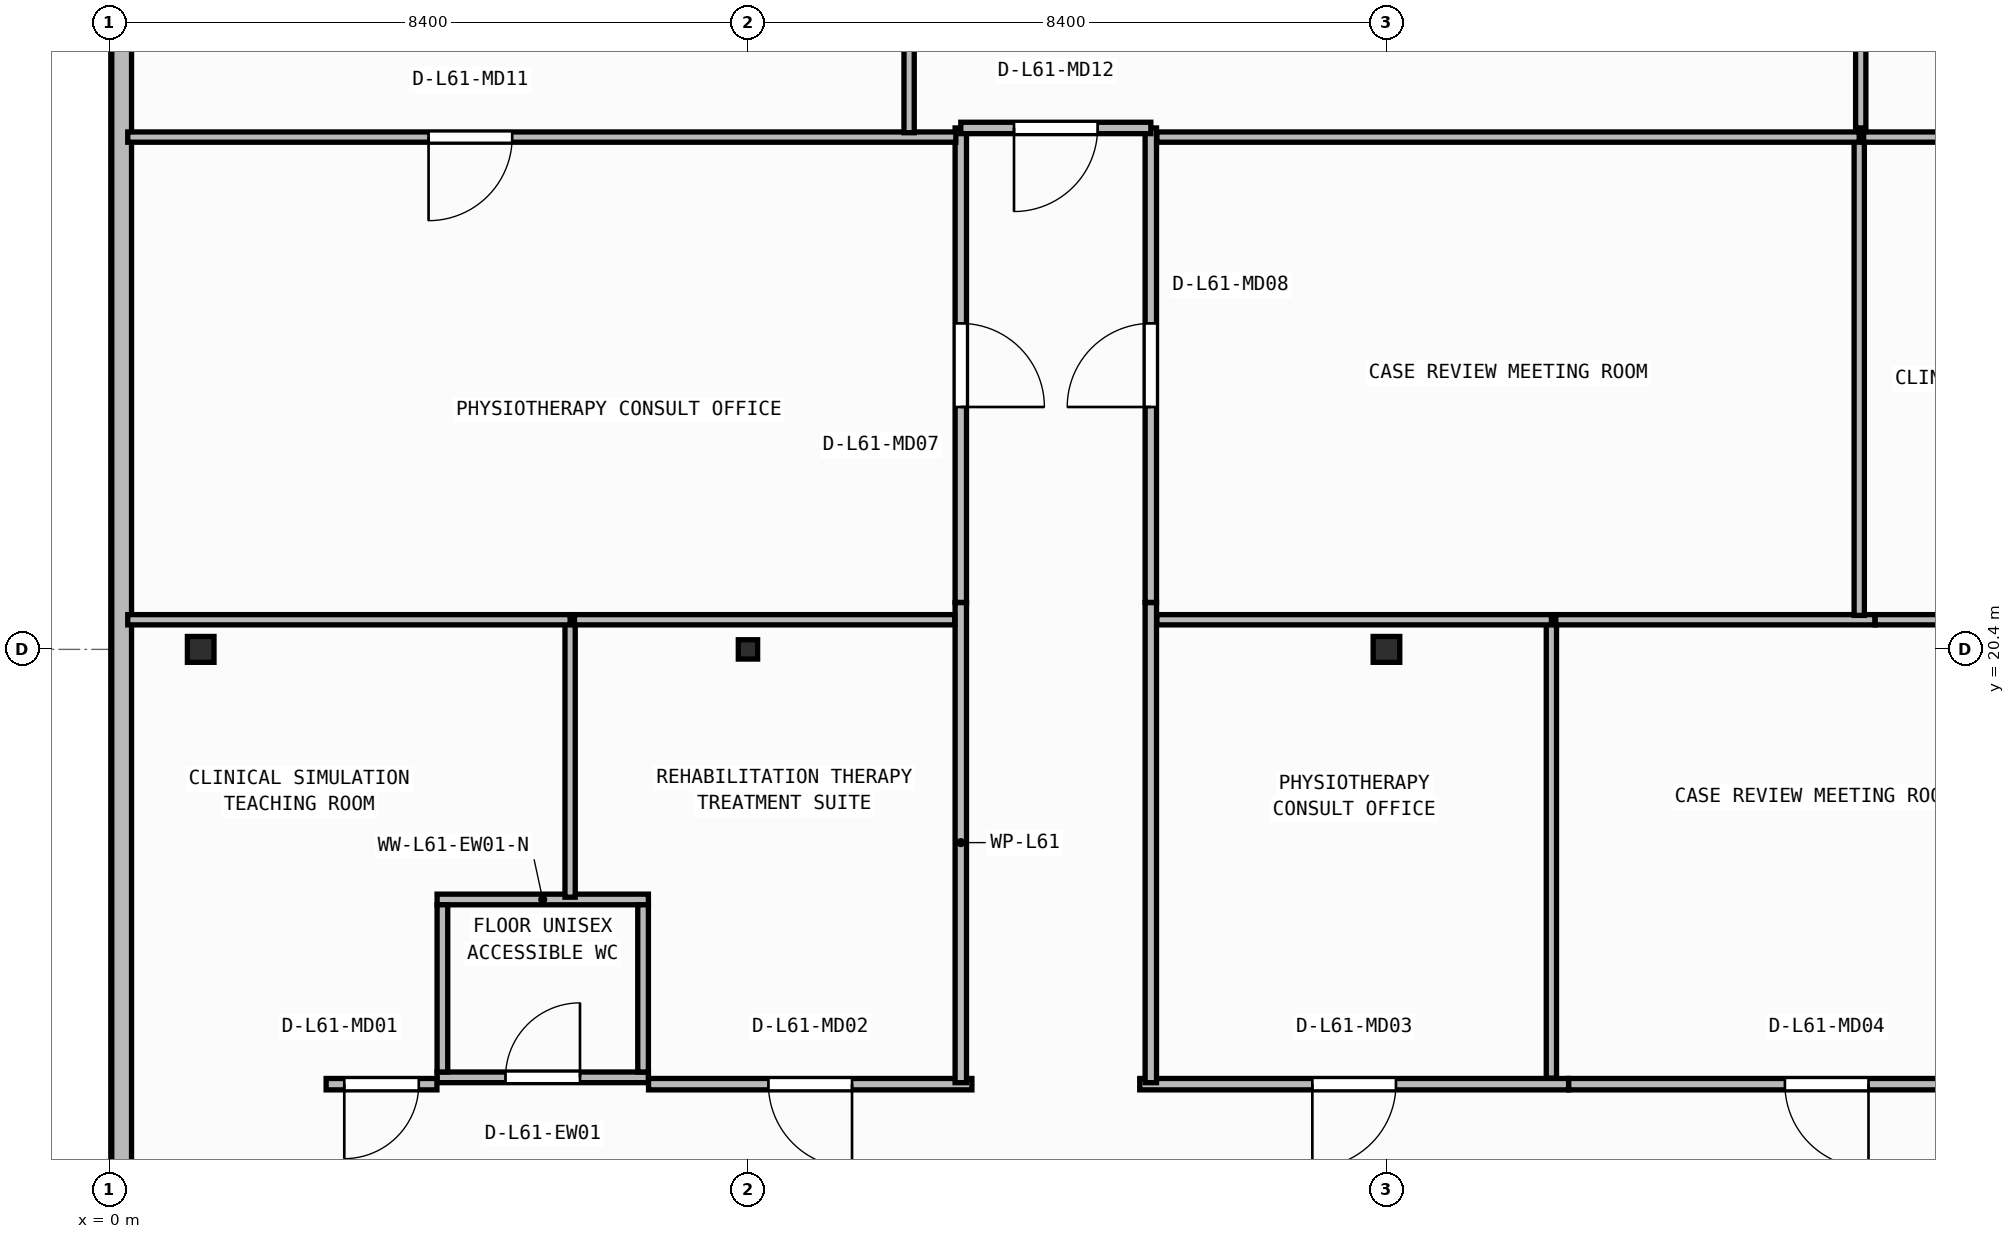
"""IFC4 building model, lengths in metres.
Left out: names, types, materials, properties, quantities, classifications, styles, units other than length and angle.
Written with IfcOpenShell. Run it as: python <this file> out.ifc"""

import sys

from ifc_helpers import new_model, si_unit, direction, frame, frame_2d, origin, origin_2d, place, context, subcontext, project, spatial, rectangle, i_section, extrude, element, fill, save


model = new_model("IFC4")
c1 = context("Model", 3, precision=1e-05, world=origin(), true_north=direction((0.0, 1.0)))
c2 = subcontext(c1, "Body", "Model", "MODEL_VIEW")
j1 = project(units=[si_unit("LENGTHUNIT", "METRE"), si_unit("PLANEANGLEUNIT", "RADIAN")], contexts=[c1])
p1 = place(None, origin())
s1 = spatial("IfcSite", under=j1, at=p1, CompositionType="ELEMENT")
p2 = place(p1, origin())
s2 = spatial("IfcBuilding", under=s1, at=p2, CompositionType="ELEMENT")
p3 = place(p2, frame((0.0, 0.0, 248.65)))
s3 = spatial("IfcBuildingStorey", under=s2, at=p3, CompositionType="ELEMENT", Elevation=248.65)
p4 = place(p3, frame((1.2, 20.4, 0.0), z_axis=(0.0, 0.0, 1.0), x_axis=(1.0, 0.0, 0.0)))
e1 = element("IfcColumn", 1, at=p4, inside=s3, PredefinedType="COLUMN", context=c2, shape_type="SweptSolid", body=[
    extrude(i_section(OverallWidth=0.35, OverallDepth=0.34, WebThickness=0.016, FlangeThickness=0.028, at=origin_2d()), origin(), (0.0, 0.0, 1.0), 3.95),
])
p5 = place(p3, frame((8.4, 20.4, 0.0), z_axis=(0.0, 0.0, 1.0), x_axis=(1.0, 0.0, 0.0)))
e2 = element("IfcColumn", 2, at=p5, inside=s3, PredefinedType="COLUMN", context=c2, shape_type="SweptSolid", body=[
    extrude(i_section(OverallWidth=0.254, OverallDepth=0.254, WebThickness=0.009, FlangeThickness=0.014, FilletRadius=0.013, at=origin_2d()), origin(), (0.0, 0.0, 1.0), 3.95),
])
p6 = place(p3, frame((16.8, 20.4, 0.0), z_axis=(0.0, 0.0, 1.0), x_axis=(1.0, 0.0, 0.0)))
e3 = element("IfcColumn", 3, at=p6, inside=s3, PredefinedType="COLUMN", context=c2, shape_type="SweptSolid", body=[
    extrude(i_section(OverallWidth=0.35, OverallDepth=0.34, WebThickness=0.016, FlangeThickness=0.028, at=origin_2d()), origin(), (0.0, 0.0, 1.0), 3.95),
])
p7 = place(p3, frame((0.16, 39.54, 0.0), z_axis=(0.0, 0.0, 1.0), x_axis=(0.0, -1.0, 0.0)))
e4 = element("IfcWall", 4, at=p7, inside=s3, PredefinedType="STANDARD", context=c2, shape_type="SweptSolid", body=[
    extrude(rectangle(XDim=36.88, YDim=0.26, at=frame_2d((18.44, 0.0))), origin(), (0.0, 0.0, 1.0), 3.71),
])
p8 = place(p7, frame((26.625, 0.0, 0.9)))
e5 = element("IfcOpeningElement", 5, at=p8, cuts=e4, PredefinedType="OPENING", context=c2, shape_type="SweptSolid", body=[
    extrude(rectangle(XDim=2.4, YDim=1.65, at=frame_2d((1.2, 0.825))), frame((0.0, 0.14, 0.0), z_axis=(0.0, -1.0, 0.0), x_axis=(1.0, 0.0, 0.0)), (0.0, 0.0, 1.0), 0.28),
])
p9 = place(p3, frame((4.31, 14.77, 0.0), z_axis=(0.0, 0.0, 1.0), x_axis=(1.0, 0.0, 0.0)))
e6 = element("IfcWall", 6, at=p9, inside=s3, PredefinedType="PARTITIONING", context=c2, shape_type="SweptSolid", body=[
    extrude(rectangle(XDim=2.78, YDim=0.14, at=frame_2d((1.39, 0.0))), origin(), (0.0, 0.0, 1.0), 3.71),
])
p10 = place(p9, frame((0.9, 0.0, 0.0)))
e7 = element("IfcOpeningElement", 7, at=p10, cuts=e6, PredefinedType="OPENING", context=c2, shape_type="SweptSolid", body=[
    extrude(rectangle(XDim=0.98, YDim=2.1, at=frame_2d((0.49, 1.05))), frame((0.0, 0.08, 0.0), z_axis=(0.0, -1.0, 0.0), x_axis=(1.0, 0.0, 0.0)), (0.0, 0.0, 1.0), 0.16),
])
p11 = place(p3, frame((4.31, 17.11, 0.0), z_axis=(0.0, 0.0, 1.0), x_axis=(1.0, 0.0, 0.0)))
e8 = element("IfcWall", 8, at=p11, inside=s3, PredefinedType="PARTITIONING", context=c2, shape_type="SweptSolid", body=[
    extrude(rectangle(XDim=2.78, YDim=0.14, at=frame_2d((1.39, 0.0))), origin(), (0.0, 0.0, 1.0), 3.71),
])
for number, where, z_axis, x_axis in (
    (9, (4.38, 14.84, 0.0), (0.0, 0.0, 1.0), (0.0, 1.0, 0.0)),
    (10, (7.02, 14.84, 0.0), (0.0, 0.0, 1.0), (0.0, 1.0, 0.0)),
):
    element("IfcWall", number, at=place(p3, frame(where, z_axis=z_axis, x_axis=x_axis)), inside=s3, PredefinedType="PARTITIONING", context=c2, shape_type="SweptSolid", body=[
        extrude(rectangle(XDim=2.2, YDim=0.14, at=frame_2d((1.1, 0.0))), origin(), (0.0, 0.0, 1.0), 3.71),
    ])
p12 = place(p3, frame((4.308, 14.68, 0.0), z_axis=(0.0, 0.0, 1.0), x_axis=(-1.0, 0.0, 0.0)))
e11 = element("IfcWall", 11, at=p12, inside=s3, PredefinedType="PARTITIONING", context=c2, shape_type="SweptSolid", body=[
    extrude(rectangle(XDim=1.458, YDim=0.15, at=frame_2d((0.729, 0.0))), origin(), (0.0, 0.0, 1.0), 3.71),
])
p13 = place(p12, frame((0.239, 0.0, 0.0)))
e12 = element("IfcOpeningElement", 12, at=p13, cuts=e11, PredefinedType="OPENING", context=c2, shape_type="SweptSolid", body=[
    extrude(rectangle(XDim=0.98, YDim=2.1, at=frame_2d((0.49, 1.05))), frame((0.0, 0.085, 0.0), z_axis=(0.0, -1.0, 0.0), x_axis=(1.0, 0.0, 0.0)), (0.0, 0.0, 1.0), 0.17),
])
p14 = place(p3, frame((11.346, 14.68, 0.0), z_axis=(0.0, 0.0, 1.0), x_axis=(-1.0, 0.0, 0.0)))
e13 = element("IfcWall", 13, at=p14, inside=s3, PredefinedType="PARTITIONING", context=c2, shape_type="SweptSolid", body=[
    extrude(rectangle(XDim=4.254, YDim=0.15, at=frame_2d((2.127, 0.0))), origin(), (0.0, 0.0, 1.0), 3.71),
])
p15 = place(p14, frame((1.577, 0.0, 0.0)))
e14 = element("IfcOpeningElement", 14, at=p15, cuts=e13, PredefinedType="OPENING", context=c2, shape_type="SweptSolid", body=[
    extrude(rectangle(XDim=1.1, YDim=2.1, at=frame_2d((0.55, 1.05))), frame((0.0, 0.085, 0.0), z_axis=(0.0, -1.0, 0.0), x_axis=(1.0, 0.0, 0.0)), (0.0, 0.0, 1.0), 0.17),
])
p16 = place(p3, frame((19.196, 14.68, 0.0), z_axis=(0.0, 0.0, 1.0), x_axis=(-1.0, 0.0, 0.0)))
e15 = element("IfcWall", 15, at=p16, inside=s3, PredefinedType="PARTITIONING", context=c2, shape_type="SweptSolid", body=[
    extrude(rectangle(XDim=5.642, YDim=0.15, at=frame_2d((2.821, 0.0))), origin(), (0.0, 0.0, 1.0), 3.71),
])
p17 = place(p16, frame((2.271, 0.0, 0.0)))
e16 = element("IfcOpeningElement", 16, at=p17, cuts=e15, PredefinedType="OPENING", context=c2, shape_type="SweptSolid", body=[
    extrude(rectangle(XDim=1.1, YDim=2.1, at=frame_2d((0.55, 1.05))), frame((0.0, 0.085, 0.0), z_axis=(0.0, -1.0, 0.0), x_axis=(1.0, 0.0, 0.0)), (0.0, 0.0, 1.0), 0.17),
])
p18 = place(p3, frame((25.986, 14.68, 0.0), z_axis=(0.0, 0.0, 1.0), x_axis=(-1.0, 0.0, 0.0)))
e17 = element("IfcWall", 17, at=p18, inside=s3, PredefinedType="PARTITIONING", context=c2, shape_type="SweptSolid", body=[
    extrude(rectangle(XDim=6.788, YDim=0.15, at=frame_2d((3.394, 0.0))), origin(), (0.0, 0.0, 1.0), 3.71),
])
p19 = place(p18, frame((2.844, 0.0, 0.0)))
e18 = element("IfcOpeningElement", 18, at=p19, cuts=e17, PredefinedType="OPENING", context=c2, shape_type="SweptSolid", body=[
    extrude(rectangle(XDim=1.1, YDim=2.1, at=frame_2d((0.55, 1.05))), frame((0.0, 0.085, 0.0), z_axis=(0.0, -1.0, 0.0), x_axis=(1.0, 0.0, 0.0)), (0.0, 0.0, 1.0), 0.17),
])
for number, where, z_axis, x_axis in (
    (19, (11.2, 21.016, 0.0), (0.0, 0.0, 1.0), (0.0, -1.0, 0.0)),
    (20, (13.7, 14.7, 0.0), (0.0, 0.0, 1.0), (0.0, 1.0, 0.0)),
):
    element("IfcWall", number, at=place(p3, frame(where, z_axis=z_axis, x_axis=x_axis)), inside=s3, PredefinedType="PARTITIONING", context=c2, shape_type="SweptSolid", body=[
        extrude(rectangle(XDim=6.316, YDim=0.15, at=frame_2d((3.158, 0.0))), origin(), (0.0, 0.0, 1.0), 3.71),
    ])
p20 = place(p3, frame((11.2, 27.26, 0.0), z_axis=(0.0, 0.0, 1.0), x_axis=(0.0, -1.0, 0.0)))
e21 = element("IfcWall", 21, at=p20, inside=s3, PredefinedType="PARTITIONING", context=c2, shape_type="SweptSolid", body=[
    extrude(rectangle(XDim=6.242, YDim=0.15, at=frame_2d((3.121, 0.0))), origin(), (0.0, 0.0, 1.0), 3.71),
])
p21 = place(p20, frame((2.571, 0.0, 0.0)))
e22 = element("IfcOpeningElement", 22, at=p21, cuts=e21, PredefinedType="OPENING", context=c2, shape_type="SweptSolid", body=[
    extrude(rectangle(XDim=1.1, YDim=2.1, at=frame_2d((0.55, 1.05))), frame((0.0, 0.085, 0.0), z_axis=(0.0, -1.0, 0.0), x_axis=(1.0, 0.0, 0.0)), (0.0, 0.0, 1.0), 0.17),
])
p22 = place(p3, frame((13.7, 21.018, 0.0), z_axis=(0.0, 0.0, 1.0), x_axis=(0.0, 1.0, 0.0)))
e23 = element("IfcWall", 23, at=p22, inside=s3, PredefinedType="PARTITIONING", context=c2, shape_type="SweptSolid", body=[
    extrude(rectangle(XDim=6.242, YDim=0.15, at=frame_2d((3.121, 0.0))), origin(), (0.0, 0.0, 1.0), 3.71),
])
p23 = place(p22, frame((2.571, 0.0, 0.0)))
e24 = element("IfcOpeningElement", 24, at=p23, cuts=e23, PredefinedType="OPENING", context=c2, shape_type="SweptSolid", body=[
    extrude(rectangle(XDim=1.1, YDim=2.1, at=frame_2d((0.55, 1.05))), frame((0.0, 0.085, 0.0), z_axis=(0.0, -1.0, 0.0), x_axis=(1.0, 0.0, 0.0)), (0.0, 0.0, 1.0), 0.17),
])
p24 = place(p3, frame((13.7, 27.26, 0.0), z_axis=(0.0, 0.0, 1.0), x_axis=(-1.0, 0.0, 0.0)))
e25 = element("IfcWall", 25, at=p24, inside=s3, PredefinedType="PARTITIONING", context=c2, shape_type="SweptSolid", body=[
    extrude(rectangle(XDim=2.5, YDim=0.15, at=frame_2d((1.25, 0.0))), origin(), (0.0, 0.0, 1.0), 3.71),
])
p25 = place(p24, frame((0.7, 0.0, 0.0)))
e26 = element("IfcOpeningElement", 26, at=p25, cuts=e25, PredefinedType="OPENING", context=c2, shape_type="SweptSolid", body=[
    extrude(rectangle(XDim=1.1, YDim=2.1, at=frame_2d((0.55, 1.05))), frame((0.0, 0.085, 0.0), z_axis=(0.0, -1.0, 0.0), x_axis=(1.0, 0.0, 0.0)), (0.0, 0.0, 1.0), 0.17),
])
p26 = place(p3, frame((6.06, 17.14, 0.0), z_axis=(0.0, 0.0, 1.0), x_axis=(0.0, 1.0, 0.0)))
e27 = element("IfcWall", 27, at=p26, inside=s3, PredefinedType="PARTITIONING", context=c2, shape_type="SweptSolid", body=[
    extrude(rectangle(XDim=3.65, YDim=0.135, at=frame_2d((1.825, 0.0))), origin(), (0.0, 0.0, 1.0), 3.71),
])
p27 = place(p3, frame((6.06, 20.79, 0.0), z_axis=(0.0, 0.0, 1.0), x_axis=(-1.0, 0.0, 0.0)))
e28 = element("IfcWall", 28, at=p27, inside=s3, PredefinedType="PARTITIONING", context=c2, shape_type="SweptSolid", body=[
    extrude(rectangle(XDim=5.82, YDim=0.135, at=frame_2d((2.91, 0.0))), origin(), (0.0, 0.0, 1.0), 3.157),
])
p28 = place(p3, frame((11.12, 20.79, 0.0), z_axis=(0.0, 0.0, 1.0), x_axis=(-1.0, 0.0, 0.0)))
e29 = element("IfcWall", 29, at=p28, inside=s3, PredefinedType="PARTITIONING", context=c2, shape_type="SweptSolid", body=[
    extrude(rectangle(XDim=5.003, YDim=0.135, at=frame_2d((2.501, 0.0))), origin(), (0.0, 0.0, 1.0), 3.157),
])
p29 = place(p3, frame((18.97, 14.76, 0.0), z_axis=(0.0, 0.0, 1.0), x_axis=(0.0, 1.0, 0.0)))
e30 = element("IfcWall", 30, at=p29, inside=s3, PredefinedType="PARTITIONING", context=c2, shape_type="SweptSolid", body=[
    extrude(rectangle(XDim=6.03, YDim=0.135, at=frame_2d((3.015, 0.0))), origin(), (0.0, 0.0, 1.0), 3.71),
])
p30 = place(p3, frame((18.97, 20.79, 0.0), z_axis=(0.0, 0.0, 1.0), x_axis=(-1.0, 0.0, 0.0)))
e31 = element("IfcWall", 31, at=p30, inside=s3, PredefinedType="PARTITIONING", context=c2, shape_type="SweptSolid", body=[
    extrude(rectangle(XDim=5.19, YDim=0.135, at=frame_2d((2.595, 0.0))), origin(), (0.0, 0.0, 1.0), 3.157),
])
p31 = place(p3, frame((23.228, 20.79, 0.0), z_axis=(0.0, 0.0, 1.0), x_axis=(-1.0, 0.0, 0.0)))
e32 = element("IfcWall", 32, at=p31, inside=s3, PredefinedType="PARTITIONING", context=c2, shape_type="SweptSolid", body=[
    extrude(rectangle(XDim=4.2, YDim=0.135, at=frame_2d((2.1, 0.0))), origin(), (0.0, 0.0, 1.0), 3.157),
])
p32 = place(p3, frame((25.76, 20.79, 0.0), z_axis=(0.0, 0.0, 1.0), x_axis=(-1.0, 0.0, 0.0)))
e33 = element("IfcWall", 33, at=p32, inside=s3, PredefinedType="PARTITIONING", context=c2, shape_type="SweptSolid", body=[
    extrude(rectangle(XDim=2.531, YDim=0.135, at=frame_2d((1.265, 0.0))), origin(), (0.0, 0.0, 1.0), 3.157),
])
p33 = place(p3, frame((11.135, 27.14, 0.0), z_axis=(0.0, 0.0, 1.0), x_axis=(-1.0, 0.0, 0.0)))
e34 = element("IfcWall", 34, at=p33, inside=s3, PredefinedType="PARTITIONING", context=c2, shape_type="SweptSolid", body=[
    extrude(rectangle(XDim=10.895, YDim=0.135, at=frame_2d((5.448, 0.0))), origin(), (0.0, 0.0, 1.0), 3.71),
])
p34 = place(p33, frame((5.837, 0.0, 0.0)))
e35 = element("IfcOpeningElement", 35, at=p34, cuts=e34, PredefinedType="OPENING", context=c2, shape_type="SweptSolid", body=[
    extrude(rectangle(XDim=1.1, YDim=2.1, at=frame_2d((0.55, 1.05))), frame((0.0, 0.077, 0.0), z_axis=(0.0, -1.0, 0.0), x_axis=(1.0, 0.0, 0.0)), (0.0, 0.0, 1.0), 0.155),
])
p35 = place(p3, frame((23.02, 20.847, 0.0), z_axis=(0.0, 0.0, 1.0), x_axis=(0.0, 1.0, 0.0)))
e36 = element("IfcWall", 36, at=p35, inside=s3, PredefinedType="PARTITIONING", context=c2, shape_type="SweptSolid", body=[
    extrude(rectangle(XDim=6.292, YDim=0.135, at=frame_2d((3.146, 0.0))), origin(), (0.0, 0.0, 1.0), 3.71),
])
p36 = place(p3, frame((23.02, 27.14, 0.0), z_axis=(0.0, 0.0, 1.0), x_axis=(-1.0, 0.0, 0.0)))
e37 = element("IfcWall", 37, at=p36, inside=s3, PredefinedType="PARTITIONING", context=c2, shape_type="SweptSolid", body=[
    extrude(rectangle(XDim=9.24, YDim=0.135, at=frame_2d((4.62, 0.0))), origin(), (0.0, 0.0, 1.0), 3.71),
])
p37 = place(p3, frame((33.86, 27.14, 0.0), z_axis=(0.0, 0.0, 1.0), x_axis=(-1.0, 0.0, 0.0)))
e38 = element("IfcWall", 38, at=p37, inside=s3, PredefinedType="PARTITIONING", context=c2, shape_type="SweptSolid", body=[
    extrude(rectangle(XDim=10.783, YDim=0.135, at=frame_2d((5.391, 0.0))), origin(), (0.0, 0.0, 1.0), 3.71),
])
p38 = place(p37, frame((3.913, 0.0, 0.0)))
e39 = element("IfcOpeningElement", 39, at=p38, cuts=e38, PredefinedType="OPENING", context=c2, shape_type="SweptSolid", body=[
    extrude(rectangle(XDim=1.1, YDim=2.1, at=frame_2d((0.55, 1.05))), frame((0.0, 0.077, 0.0), z_axis=(0.0, -1.0, 0.0), x_axis=(1.0, 0.0, 0.0)), (0.0, 0.0, 1.0), 0.155),
])
p39 = place(p3, frame((10.52, 27.198, 0.0), z_axis=(0.0, 0.0, 1.0), x_axis=(0.0, 1.0, 0.0)))
e40 = element("IfcWall", 40, at=p39, inside=s3, PredefinedType="PARTITIONING", context=c2, shape_type="SweptSolid", body=[
    extrude(rectangle(XDim=9.164, YDim=0.135, at=frame_2d((4.582, 0.0))), origin(), (0.0, 0.0, 1.0), 3.71),
])
p40 = place(p3, frame((23.04, 27.26, 0.0), z_axis=(0.0, 0.0, 1.0), x_axis=(0.0, 1.0, 0.0)))
e41 = element("IfcWall", 41, at=p40, inside=s3, PredefinedType="PARTITIONING", context=c2, shape_type="SweptSolid", body=[
    extrude(rectangle(XDim=4.234, YDim=0.135, at=frame_2d((2.117, 0.0))), origin(), (0.0, 0.0, 1.0), 3.71),
])
p41 = place(p10, origin())
e42 = element("IfcDoor", 42, at=p41, inside=s3, OperationType="SINGLE_SWING_RIGHT", PredefinedType="DOOR", context=c2, shape_type="SweptSolid", body=[
    extrude(rectangle(XDim=0.98, YDim=2.1, at=frame_2d((0.49, 1.05))), frame((0.0, 0.025, 0.0), z_axis=(0.0, -1.0, 0.0), x_axis=(1.0, 0.0, 0.0)), (0.0, 0.0, 1.0), 0.05),
])
fill(e7, e42)
p42 = place(p13, origin())
e43 = element("IfcDoor", 43, at=p42, inside=s3, OperationType="SINGLE_SWING_RIGHT", PredefinedType="DOOR", context=c2, shape_type="SweptSolid", body=[
    extrude(rectangle(XDim=0.98, YDim=2.1, at=frame_2d((0.49, 1.05))), frame((0.0, 0.025, 0.0), z_axis=(0.0, -1.0, 0.0), x_axis=(1.0, 0.0, 0.0)), (0.0, 0.0, 1.0), 0.05),
])
fill(e12, e43)
p43 = place(p15, origin())
e44 = element("IfcDoor", 44, at=p43, inside=s3, OperationType="SINGLE_SWING_LEFT", PredefinedType="DOOR", context=c2, shape_type="SweptSolid", body=[
    extrude(rectangle(XDim=1.1, YDim=2.1, at=frame_2d((0.55, 1.05))), frame((0.0, 0.025, 0.0), z_axis=(0.0, -1.0, 0.0), x_axis=(1.0, 0.0, 0.0)), (0.0, 0.0, 1.0), 0.05),
])
fill(e14, e44)
p44 = place(p17, origin())
e45 = element("IfcDoor", 45, at=p44, inside=s3, OperationType="SINGLE_SWING_RIGHT", PredefinedType="DOOR", context=c2, shape_type="SweptSolid", body=[
    extrude(rectangle(XDim=1.1, YDim=2.1, at=frame_2d((0.55, 1.05))), frame((0.0, 0.025, 0.0), z_axis=(0.0, -1.0, 0.0), x_axis=(1.0, 0.0, 0.0)), (0.0, 0.0, 1.0), 0.05),
])
fill(e16, e45)
p45 = place(p19, origin())
e46 = element("IfcDoor", 46, at=p45, inside=s3, OperationType="SINGLE_SWING_LEFT", PredefinedType="DOOR", context=c2, shape_type="SweptSolid", body=[
    extrude(rectangle(XDim=1.1, YDim=2.1, at=frame_2d((0.55, 1.05))), frame((0.0, 0.025, 0.0), z_axis=(0.0, -1.0, 0.0), x_axis=(1.0, 0.0, 0.0)), (0.0, 0.0, 1.0), 0.05),
])
fill(e18, e46)
p46 = place(p21, origin())
e47 = element("IfcDoor", 47, at=p46, inside=s3, OperationType="SINGLE_SWING_RIGHT", PredefinedType="DOOR", context=c2, shape_type="SweptSolid", body=[
    extrude(rectangle(XDim=1.1, YDim=2.1, at=frame_2d((0.55, 1.05))), frame((0.0, 0.025, 0.0), z_axis=(0.0, -1.0, 0.0), x_axis=(1.0, 0.0, 0.0)), (0.0, 0.0, 1.0), 0.05),
])
fill(e22, e47)
p47 = place(p23, origin())
e48 = element("IfcDoor", 48, at=p47, inside=s3, OperationType="SINGLE_SWING_LEFT", PredefinedType="DOOR", context=c2, shape_type="SweptSolid", body=[
    extrude(rectangle(XDim=1.1, YDim=2.1, at=frame_2d((0.55, 1.05))), frame((0.0, 0.025, 0.0), z_axis=(0.0, -1.0, 0.0), x_axis=(1.0, 0.0, 0.0)), (0.0, 0.0, 1.0), 0.05),
])
fill(e24, e48)
p48 = place(p25, origin())
e49 = element("IfcDoor", 49, at=p48, inside=s3, OperationType="SINGLE_SWING_RIGHT", PredefinedType="DOOR", context=c2, shape_type="SweptSolid", body=[
    extrude(rectangle(XDim=1.1, YDim=2.1, at=frame_2d((0.55, 1.05))), frame((0.0, 0.025, 0.0), z_axis=(0.0, -1.0, 0.0), x_axis=(1.0, 0.0, 0.0)), (0.0, 0.0, 1.0), 0.05),
])
fill(e26, e49)
p49 = place(p34, origin())
e50 = element("IfcDoor", 50, at=p49, inside=s3, OperationType="SINGLE_SWING_RIGHT", PredefinedType="DOOR", context=c2, shape_type="SweptSolid", body=[
    extrude(rectangle(XDim=1.1, YDim=2.1, at=frame_2d((0.55, 1.05))), frame((0.0, 0.025, 0.0), z_axis=(0.0, -1.0, 0.0), x_axis=(1.0, 0.0, 0.0)), (0.0, 0.0, 1.0), 0.05),
])
fill(e35, e50)
save(model, sys.argv[1])
